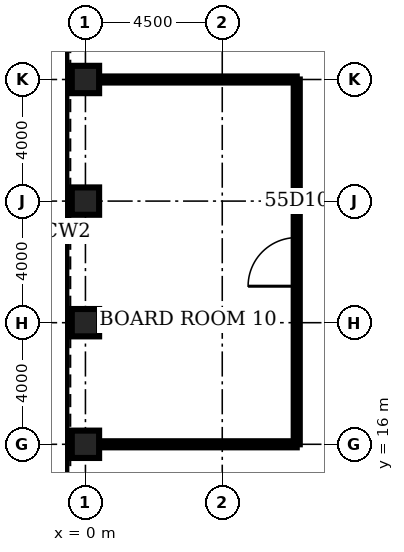
"""IFC4 building model, lengths in metres.
Left out: names, types, materials, properties, quantities, classifications, styles, units other than length and angle.
Written with IfcOpenShell. Run it as: python <this file> out.ifc"""

import sys

from ifc_helpers import new_model, si_unit, direction, frame, frame_2d, origin, origin_2d, place, context, subcontext, project, spatial, rectangle, hollow_rectangle, extrude, element, fill, save


model = new_model("IFC4")
c1 = context("Model", 3, precision=1e-05, world=origin(), true_north=direction((0.0, 1.0)))
c2 = subcontext(c1, "Body", "Model", "MODEL_VIEW")
j1 = project(units=[si_unit("LENGTHUNIT", "METRE"), si_unit("PLANEANGLEUNIT", "RADIAN")], contexts=[c1])
p1 = place(None, origin())
s1 = spatial("IfcSite", under=j1, at=p1, CompositionType="ELEMENT")
p2 = place(p1, origin())
s2 = spatial("IfcBuilding", under=s1, at=p2, CompositionType="ELEMENT")
p3 = place(p2, frame((0.0, 0.0, 244.6)))
s3 = spatial("IfcBuildingStorey", under=s2, at=p3, CompositionType="ELEMENT", Elevation=244.6)
for number, where, z_axis, x_axis in (
    (1, (0.0, 28.0, 0.0), (0.0, 0.0, 1.0), (1.0, 0.0, 0.0)),
    (2, (0.0, 24.0, 0.0), (0.0, 0.0, 1.0), (1.0, 0.0, 0.0)),
    (3, (0.0, 20.0, 0.0), (0.0, 0.0, 1.0), (1.0, 0.0, 0.0)),
    (4, (0.0, 16.0, 0.0), (0.0, 0.0, 1.0), (1.0, 0.0, 0.0)),
):
    element("IfcColumn", number, at=place(p3, frame(where, z_axis=z_axis, x_axis=x_axis)), inside=s3, PredefinedType="COLUMN", context=c2, shape_type="SweptSolid", body=[
        extrude(hollow_rectangle(XDim=0.9, YDim=0.9, WallThickness=0.08, at=origin_2d()), origin(), (0.0, 0.0, 1.0), 4.2),
    ])
for number, where, z_axis, x_axis in (
    (5, (0.45, 16.0, 0.0), (0.0, 0.0, 1.0), (1.0, 0.0, 0.0)),
    (6, (0.45, 28.0, 0.0), (0.0, 0.0, 1.0), (1.0, 0.0, 0.0)),
):
    element("IfcWall", number, at=place(p3, frame(where, z_axis=z_axis, x_axis=x_axis)), inside=s3, PredefinedType="PARTITIONING", context=c2, shape_type="SweptSolid", body=[
        extrude(rectangle(XDim=6.5, YDim=0.2, at=frame_2d((3.25, 0.0))), origin(), (0.0, 0.0, 1.0), 3.0),
    ])
p4 = place(p3, frame((6.95, 16.0, 0.0), z_axis=(0.0, 0.0, 1.0), x_axis=(0.0, 1.0, 0.0)))
e7 = element("IfcWall", 7, at=p4, inside=s3, PredefinedType="PARTITIONING", context=c2, shape_type="SweptSolid", body=[
    extrude(rectangle(XDim=12.0, YDim=0.2, at=frame_2d((6.0, 0.0))), origin(), (0.0, 0.0, 1.0), 3.0),
])
p5 = place(p4, frame((5.2, 0.0, 0.0)))
e8 = element("IfcOpeningElement", 8, at=p5, cuts=e7, PredefinedType="OPENING", context=c2, shape_type="SweptSolid", body=[
    extrude(rectangle(XDim=1.6, YDim=2.1, at=frame_2d((0.8, 1.05))), frame((0.0, 0.11, 0.0), z_axis=(0.0, -1.0, 0.0), x_axis=(1.0, 0.0, 0.0)), (0.0, 0.0, 1.0), 0.22),
])
p6 = place(p5, origin())
e9 = element("IfcDoor", 9, at=p6, inside=s3, OperationType="SINGLE_SWING_LEFT", PredefinedType="DOOR", context=c2, shape_type="SweptSolid", body=[
    extrude(rectangle(XDim=1.6, YDim=2.1, at=frame_2d((0.8, 1.05))), frame((0.0, 0.025, 0.0), z_axis=(0.0, -1.0, 0.0), x_axis=(1.0, 0.0, 0.0)), (0.0, 0.0, 1.0), 0.05),
])
fill(e8, e9)
save(model, sys.argv[1])
